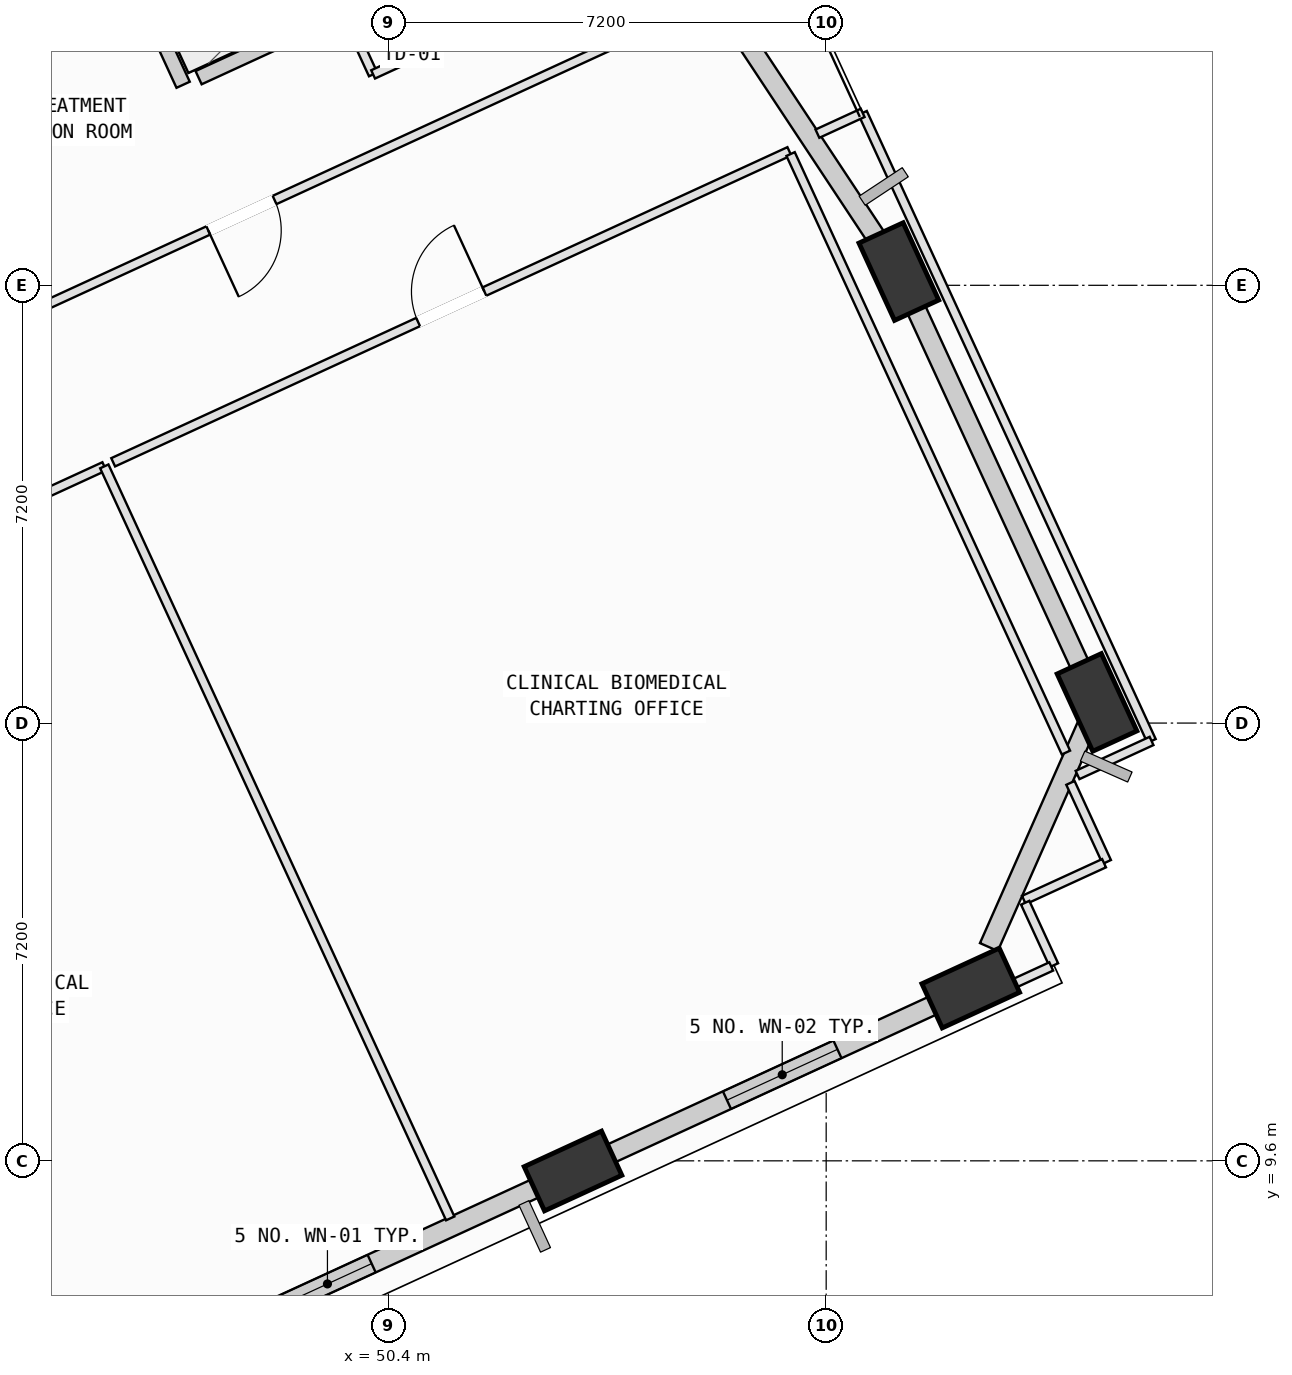
"""IFC4 building model, lengths in metres.
Left out: names, types, materials, properties, quantities, classifications, styles, units other than length and angle.
Written with IfcOpenShell. Run it as: python <this file> out.ifc"""

import sys

from ifc_helpers import new_model, si_unit, direction, frame, frame_2d, origin, origin_2d, place, context, subcontext, project, spatial, rectangle, extrude, element, fill, save


model = new_model("IFC4")
c1 = context("Model", 3, precision=1e-05, world=origin(), true_north=direction((0.0, 1.0)))
c2 = subcontext(c1, "Body", "Model", "MODEL_VIEW")
j1 = project(units=[si_unit("LENGTHUNIT", "METRE"), si_unit("PLANEANGLEUNIT", "RADIAN")], contexts=[c1])
p1 = place(None, origin())
s1 = spatial("IfcSite", under=j1, at=p1, CompositionType="ELEMENT")
p2 = place(p1, origin())
s2 = spatial("IfcBuilding", under=s1, at=p2, CompositionType="ELEMENT")
p3 = place(p2, frame((0.0, 0.0, 128.4)))
s3 = spatial("IfcBuildingStorey", under=s2, at=p3, CompositionType="ELEMENT", Elevation=128.4)
p4 = place(p3, frame((53.436, 9.433, 0.002), z_axis=(0.062707446692, 0.082333905298, 0.994630033815), x_axis=(-0.974580931044, 0.219822003977, 0.043246912178)))
e1 = element("IfcColumn", 1, at=p4, inside=s3, PredefinedType="COLUMN", context=c2, shape_type="SweptSolid", body=[
    extrude(rectangle(XDim=1.4, YDim=0.8, at=origin_2d()), origin(), (0.0, 0.0, 1.0), 4.018),
])
p5 = place(p3, frame((59.978, 12.442, 0.002), z_axis=(0.049976235461, 0.108928785058, 0.992792473619), x_axis=(-0.998743622915, 0.001786759957, 0.050079768123)))
e2 = element("IfcColumn", 2, at=p5, inside=s3, PredefinedType="COLUMN", context=c2, shape_type="SweptSolid", body=[
    extrude(rectangle(XDim=1.4, YDim=0.8, at=origin_2d()), origin(), (0.0, 0.0, 1.0), 4.025),
])
p6 = place(p3, frame((62.054, 17.139, 0.002), z_axis=(0.030562724867, 0.117339032971, 0.992621514572), x_axis=(0.177070531246, -0.978013675375, 0.110160236673)))
e3 = element("IfcColumn", 3, at=p6, inside=s3, PredefinedType="COLUMN", context=c2, shape_type="SweptSolid", body=[
    extrude(rectangle(XDim=1.4, YDim=0.8, at=origin_2d()), origin(), (0.0, 0.0, 1.0), 4.026),
])
p7 = place(p3, frame((58.795, 24.226, 0.002), z_axis=(0.001519009353, 0.103900239722, 0.994586563752), x_axis=(0.40461345437, -0.909601989756, 0.094404304852)))
e4 = element("IfcColumn", 4, at=p7, inside=s3, PredefinedType="COLUMN", context=c2, shape_type="SweptSolid", body=[
    extrude(rectangle(XDim=1.4, YDim=0.8, at=origin_2d()), origin(), (0.0, 0.0, 1.0), 4.018),
])
p8 = place(p3, frame((47.279, 27.415, 0.0), z_axis=(0.0, 0.0, 1.0), x_axis=(0.90849764427, 0.417889973983, 0.0)))
e5 = element("IfcWall", 5, at=p8, inside=s3, PredefinedType="SOLIDWALL", context=c2, shape_type="SweptSolid", body=[
    extrude(rectangle(XDim=6.96, YDim=0.24, at=frame_2d((3.48, 0.0))), origin(), (0.0, 0.0, 1.0), 2.945),
])
p9 = place(p8, frame((2.93, 0.0, 0.0)))
e6 = element("IfcOpeningElement", 6, at=p9, cuts=e5, PredefinedType="OPENING", context=c2, shape_type="SweptSolid", body=[
    extrude(rectangle(XDim=1.1, YDim=2.15, at=frame_2d((0.55, 1.075))), frame((0.0, 0.13, 0.0), z_axis=(0.0, -1.0, 0.0), x_axis=(1.0, 0.0, 0.0)), (0.0, 0.0, 1.0), 0.26),
])
p10 = place(p3, frame((45.98, 29.569, 0.0), z_axis=(0.0, 0.0, 1.0), x_axis=(0.417874979305, -0.908504541359, 0.0)))
e7 = element("IfcWall", 7, at=p10, inside=s3, PredefinedType="SOLIDWALL", context=c2, shape_type="SweptSolid", body=[
    extrude(rectangle(XDim=2.5, YDim=0.24, at=frame_2d((1.25, 0.0))), origin(), (0.0, 0.0, 1.0), 3.165),
])
p11 = place(p3, frame((53.161, 9.306, 0.0), z_axis=(0.0, 0.0, 1.0), x_axis=(-0.908511320159, -0.41786024116, 0.0)))
e8 = element("IfcWall", 8, at=p11, inside=s3, PredefinedType="SOLIDWALL", context=c2, shape_type="SweptSolid", body=[
    extrude(rectangle(XDim=6.218, YDim=0.32, at=frame_2d((3.109, 0.0))), origin(), (0.0, 0.0, 1.0), 3.165),
])
p12 = place(p11, frame((3.342, 0.0, 0.75)))
e9 = element("IfcOpeningElement", 9, at=p12, cuts=e8, PredefinedType="OPENING", context=c2, shape_type="SweptSolid", body=[
    extrude(rectangle(XDim=1.6, YDim=1.95, at=frame_2d((0.8, 0.975))), frame((0.0, 0.17, 0.0), z_axis=(0.0, -1.0, 0.0), x_axis=(1.0, 0.0, 0.0)), (0.0, 0.0, 1.0), 0.34),
])
p13 = place(p3, frame((59.716, 12.322, 0.0), z_axis=(0.0, 0.0, 1.0), x_axis=(-0.908495501198, -0.417894633015, 0.0)))
e10 = element("IfcWall", 10, at=p13, inside=s3, PredefinedType="SOLIDWALL", context=c2, shape_type="SweptSolid", body=[
    extrude(rectangle(XDim=6.242, YDim=0.32, at=frame_2d((3.121, 0.0))), origin(), (0.0, 0.0, 1.0), 3.165),
])
p14 = place(p13, frame((2.125, 0.0, 0.75)))
e11 = element("IfcOpeningElement", 11, at=p14, cuts=e10, PredefinedType="OPENING", context=c2, shape_type="SweptSolid", body=[
    extrude(rectangle(XDim=2.0, YDim=1.95, at=frame_2d((1.0, 0.975))), frame((0.0, 0.17, 0.0), z_axis=(0.0, -1.0, 0.0), x_axis=(1.0, 0.0, 0.0)), (0.0, 0.0, 1.0), 0.34),
])
p15 = place(p3, frame((61.952, 16.907, 0.0), z_axis=(0.0, 0.0, 1.0), x_axis=(-0.404328860334, -0.914613674018, 0.0)))
e12 = element("IfcWall", 12, at=p15, inside=s3, PredefinedType="SOLIDWALL", context=c2, shape_type="SweptSolid", body=[
    extrude(rectangle(XDim=4.145, YDim=0.32, at=frame_2d((2.073, 0.0))), origin(), (0.0, 0.0, 1.0), 3.165),
])
p16 = place(p3, frame((58.92, 23.954, 0.0), z_axis=(0.0, 0.0, 1.0), x_axis=(0.417864953171, -0.908509152905, 0.0)))
e13 = element("IfcWall", 13, at=p16, inside=s3, PredefinedType="SOLIDWALL", context=c2, shape_type="SweptSolid", body=[
    extrude(rectangle(XDim=6.84, YDim=0.32, at=frame_2d((3.42, 0.0))), origin(), (0.0, 0.0, 1.0), 3.165),
])
p17 = place(p3, frame((53.557, 32.142, 0.0), z_axis=(0.0, 0.0, 1.0), x_axis=(0.551777055877, -0.833991654999, 0.0)))
e14 = element("IfcWall", 14, at=p17, inside=s3, PredefinedType="SOLIDWALL", context=c2, shape_type="SweptSolid", body=[
    extrude(rectangle(XDim=8.838, YDim=0.32, at=frame_2d((4.419, 0.0))), origin(), (0.0, 0.0, 1.0), 3.165),
])
p18 = place(p3, frame((41.526, 26.959, 0.0), z_axis=(0.0, 0.0, 1.0), x_axis=(0.908514361861, 0.417853627832, 0.0)))
e15 = element("IfcWall", 15, at=p18, inside=s3, PredefinedType="SOLIDWALL", context=c2, shape_type="SweptSolid", body=[
    extrude(rectangle(XDim=5.117, YDim=0.32, at=frame_2d((2.559, 0.0))), origin(), (0.0, 0.0, 1.0), 3.145),
])
p19 = place(p18, frame((1.835, 0.0, 0.75)))
e16 = element("IfcOpeningElement", 16, at=p19, cuts=e15, PredefinedType="OPENING", context=c2, shape_type="SweptSolid", body=[
    extrude(rectangle(XDim=1.6, YDim=1.95, at=frame_2d((0.8, 0.975))), frame((0.0, 0.17, 0.0), z_axis=(0.0, -1.0, 0.0), x_axis=(1.0, 0.0, 0.0)), (0.0, 0.0, 1.0), 0.34),
])
p20 = place(p3, frame((36.5, 16.778, 0.0), z_axis=(0.0, 0.0, 1.0), x_axis=(0.908527682077, 0.417824665261, 0.0)))
e17 = element("IfcWall", 17, at=p20, inside=s3, PredefinedType="PARTITIONING", context=c2, shape_type="SweptSolid", body=[
    extrude(rectangle(XDim=10.157, YDim=0.15, at=frame_2d((5.079, 0.0))), origin(), (0.0, 0.0, 1.0), 2.965),
])
p21 = place(p20, frame((4.479, 0.0, 0.0)))
e18 = element("IfcOpeningElement", 18, at=p21, cuts=e17, PredefinedType="OPENING", context=c2, shape_type="SweptSolid", body=[
    extrude(rectangle(XDim=1.2, YDim=2.15, at=frame_2d((0.6, 1.075))), frame((0.0, 0.085, 0.0), z_axis=(0.0, -1.0, 0.0), x_axis=(1.0, 0.0, 0.0)), (0.0, 0.0, 1.0), 0.17),
])
p22 = place(p3, frame((45.728, 21.022, 0.0), z_axis=(0.0, 0.0, 1.0), x_axis=(0.417861501893, -0.908510740297, 0.0)))
e19 = element("IfcWall", 19, at=p22, inside=s3, PredefinedType="PARTITIONING", context=c2, shape_type="SweptSolid", body=[
    extrude(rectangle(XDim=13.615, YDim=0.15, at=frame_2d((6.807, 0.0))), origin(), (0.0, 0.0, 1.0), 3.78),
])
p23 = place(p3, frame((45.874, 21.089, 0.0), z_axis=(0.0, 0.0, 1.0), x_axis=(0.90849514781, 0.417895401273, 0.0)))
e20 = element("IfcWall", 20, at=p23, inside=s3, PredefinedType="PARTITIONING", context=c2, shape_type="SweptSolid", body=[
    extrude(rectangle(XDim=12.24, YDim=0.15, at=frame_2d((6.12, 0.0))), origin(), (0.0, 0.0, 1.0), 3.78),
])
p24 = place(p23, frame((5.52, 0.0, 0.0)))
e21 = element("IfcOpeningElement", 21, at=p24, cuts=e20, PredefinedType="OPENING", context=c2, shape_type="SweptSolid", body=[
    extrude(rectangle(XDim=1.2, YDim=2.15, at=frame_2d((0.6, 1.075))), frame((0.0, 0.085, 0.0), z_axis=(0.0, -1.0, 0.0), x_axis=(1.0, 0.0, 0.0)), (0.0, 0.0, 1.0), 0.17),
])
p25 = place(p3, frame((57.015, 26.159, 0.0), z_axis=(0.0, 0.0, 1.0), x_axis=(0.417893334467, -0.90849609851, 0.0)))
e22 = element("IfcWall", 22, at=p25, inside=s3, PredefinedType="PARTITIONING", context=c2, shape_type="SweptSolid", body=[
    extrude(rectangle(XDim=10.835, YDim=0.15, at=frame_2d((5.418, 0.0))), origin(), (0.0, 0.0, 1.0), 3.78),
])
p26 = place(p3, frame((61.617, 15.816, 0.0), z_axis=(0.0, 0.0, 1.0), x_axis=(0.418040799826, -0.908428252357, 0.0)))
e23 = element("IfcWall", 23, at=p26, inside=s3, PredefinedType="PARTITIONING", context=c2, shape_type="SweptSolid", body=[
    extrude(rectangle(XDim=1.431, YDim=0.15, at=frame_2d((0.715, 0.0))), origin(), (0.0, 0.0, 1.0), 3.78),
])
p27 = place(p3, frame((62.17, 14.495, 0.0), z_axis=(0.0, 0.0, 1.0), x_axis=(-0.908751053696, -0.417338618398, 0.0)))
e24 = element("IfcWall", 24, at=p27, inside=s3, PredefinedType="PARTITIONING", context=c2, shape_type="SweptSolid", body=[
    extrude(rectangle(XDim=1.45, YDim=0.15, at=frame_2d((0.725, 0.0))), origin(), (0.0, 0.0, 1.0), 3.78),
])
p28 = place(p3, frame((60.873, 13.845, 0.0), z_axis=(0.0, 0.0, 1.0), x_axis=(0.418304824386, -0.908306706953, 0.0)))
e25 = element("IfcWall", 25, at=p28, inside=s3, PredefinedType="PARTITIONING", context=c2, shape_type="SweptSolid", body=[
    extrude(rectangle(XDim=1.131, YDim=0.15, at=frame_2d((0.565, 0.0))), origin(), (0.0, 0.0, 1.0), 3.78),
])
p29 = place(p3, frame((61.301, 12.797, 0.0), z_axis=(0.0, 0.0, 1.0), x_axis=(-0.908690592255, -0.417470247499, 0.0)))
e26 = element("IfcWall", 26, at=p29, inside=s3, PredefinedType="PARTITIONING", context=c2, shape_type="SweptSolid", body=[
    extrude(rectangle(XDim=1.639, YDim=0.15, at=frame_2d((0.819, 0.0))), origin(), (0.0, 0.0, 1.0), 3.78),
])
p30 = place(p3, frame((54.141, 9.504, 0.0), z_axis=(0.0, 0.0, 1.0), x_axis=(-0.908362785779, -0.418183033387, 0.0)))
e27 = element("IfcWall", 27, at=p30, inside=s3, PredefinedType="PARTITIONING", context=c2, shape_type="SweptSolid", body=[
    extrude(rectangle(XDim=0.973, YDim=0.15, at=frame_2d((0.487, 0.0))), origin(), (0.0, 0.0, 1.0), 3.165),
])
p31 = place(p3, frame((49.708, 28.428, 0.0), z_axis=(0.0, 0.0, 1.0), x_axis=(0.417737601107, -0.908567717136, 0.0)))
e28 = element("IfcWall", 28, at=p31, inside=s3, PredefinedType="PARTITIONING", context=c2, shape_type="SweptSolid", body=[
    extrude(rectangle(XDim=1.055, YDim=0.15, at=frame_2d((0.528, 0.0))), origin(), (0.0, 0.0, 1.0), 3.78),
])
p32 = place(p3, frame((50.149, 27.469, 0.0), z_axis=(0.0, 0.0, 1.0), x_axis=(0.908354092622, 0.418201915845, 0.0)))
e29 = element("IfcWall", 29, at=p32, inside=s3, PredefinedType="PARTITIONING", context=c2, shape_type="SweptSolid", body=[
    extrude(rectangle(XDim=1.7, YDim=0.15, at=frame_2d((0.85, 0.0))), origin(), (0.0, 0.0, 1.0), 3.78),
])
p33 = place(p3, frame((55.678, 28.692, 0.0), z_axis=(0.0, 0.0, 1.0), x_axis=(-0.908501505358, -0.417881579832, 0.0)))
e30 = element("IfcWall", 30, at=p33, inside=s3, PredefinedType="PARTITIONING", context=c2, shape_type="SweptSolid", body=[
    extrude(rectangle(XDim=16.94, YDim=0.15, at=frame_2d((8.47, 0.0))), origin(), (0.0, 0.0, 1.0), 2.945),
])
p34 = place(p33, frame((7.87, 0.0, 0.0)))
e31 = element("IfcOpeningElement", 31, at=p34, cuts=e30, PredefinedType="OPENING", context=c2, shape_type="SweptSolid", body=[
    extrude(rectangle(XDim=1.2, YDim=2.15, at=frame_2d((0.6, 1.075))), frame((0.0, 0.085, 0.0), z_axis=(0.0, -1.0, 0.0), x_axis=(1.0, 0.0, 0.0)), (0.0, 0.0, 1.0), 0.17),
])
p35 = place(p3, frame((58.2, 26.836, 0.0), z_axis=(0.0, 0.0, 1.0), x_axis=(0.417851377293, -0.90851539695, 0.0)))
e32 = element("IfcWall", 32, at=p35, inside=s3, PredefinedType="PARTITIONING", context=c2, shape_type="SweptSolid", body=[
    extrude(rectangle(XDim=11.37, YDim=0.15, at=frame_2d((5.685, 0.0))), origin(), (0.0, 0.0, 1.0), 3.165),
])
p36 = place(p3, frame((62.951, 16.506, 0.0), z_axis=(0.0, 0.0, 1.0), x_axis=(-0.908428174365, -0.418040969307, 0.0)))
e33 = element("IfcWall", 33, at=p36, inside=s3, PredefinedType="PARTITIONING", context=c2, shape_type="SweptSolid", body=[
    extrude(rectangle(XDim=1.34, YDim=0.15, at=frame_2d((0.67, 0.0))), origin(), (0.0, 0.0, 1.0), 3.78),
])
p37 = place(p3, frame((57.456, 26.494, 0.0), z_axis=(0.0, 0.0, 1.0), x_axis=(0.908560629295, 0.41775301662, 0.0)))
e34 = element("IfcWall", 34, at=p37, inside=s3, PredefinedType="PARTITIONING", context=c2, shape_type="SweptSolid", body=[
    extrude(rectangle(XDim=0.819, YDim=0.15, at=frame_2d((0.409, 0.0))), origin(), (0.0, 0.0, 1.0), 3.78),
])
p38 = place(p12, origin())
e35 = element("IfcWindow", 35, at=p38, inside=s3, PartitioningType="SINGLE_PANEL", PredefinedType="WINDOW", context=c2, shape_type="SweptSolid", body=[
    extrude(rectangle(XDim=1.6, YDim=1.95, at=frame_2d((0.8, 0.975))), frame((0.0, 0.03, 0.0), z_axis=(0.0, -1.0, 0.0), x_axis=(1.0, 0.0, 0.0)), (0.0, 0.0, 1.0), 0.06),
])
fill(e9, e35)
p39 = place(p14, origin())
e36 = element("IfcWindow", 36, at=p39, inside=s3, PartitioningType="SINGLE_PANEL", PredefinedType="WINDOW", context=c2, shape_type="SweptSolid", body=[
    extrude(rectangle(XDim=2.0, YDim=1.95, at=frame_2d((1.0, 0.975))), frame((0.0, 0.03, 0.0), z_axis=(0.0, -1.0, 0.0), x_axis=(1.0, 0.0, 0.0)), (0.0, 0.0, 1.0), 0.06),
])
fill(e11, e36)
p40 = place(p24, origin())
e37 = element("IfcDoor", 37, at=p40, inside=s3, OperationType="SINGLE_SWING_RIGHT", PredefinedType="DOOR", context=c2, shape_type="SweptSolid", body=[
    extrude(rectangle(XDim=1.2, YDim=2.15, at=frame_2d((0.6, 1.075))), frame((0.0, 0.025, 0.0), z_axis=(0.0, -1.0, 0.0), x_axis=(1.0, 0.0, 0.0)), (0.0, 0.0, 1.0), 0.05),
])
fill(e21, e37)
p41 = place(p34, origin())
e38 = element("IfcDoor", 38, at=p41, inside=s3, OperationType="SINGLE_SWING_RIGHT", PredefinedType="DOOR", context=c2, shape_type="SweptSolid", body=[
    extrude(rectangle(XDim=1.2, YDim=2.15, at=frame_2d((0.6, 1.075))), frame((0.0, 0.025, 0.0), z_axis=(0.0, -1.0, 0.0), x_axis=(1.0, 0.0, 0.0)), (0.0, 0.0, 1.0), 0.05),
])
fill(e31, e38)
save(model, sys.argv[1])
